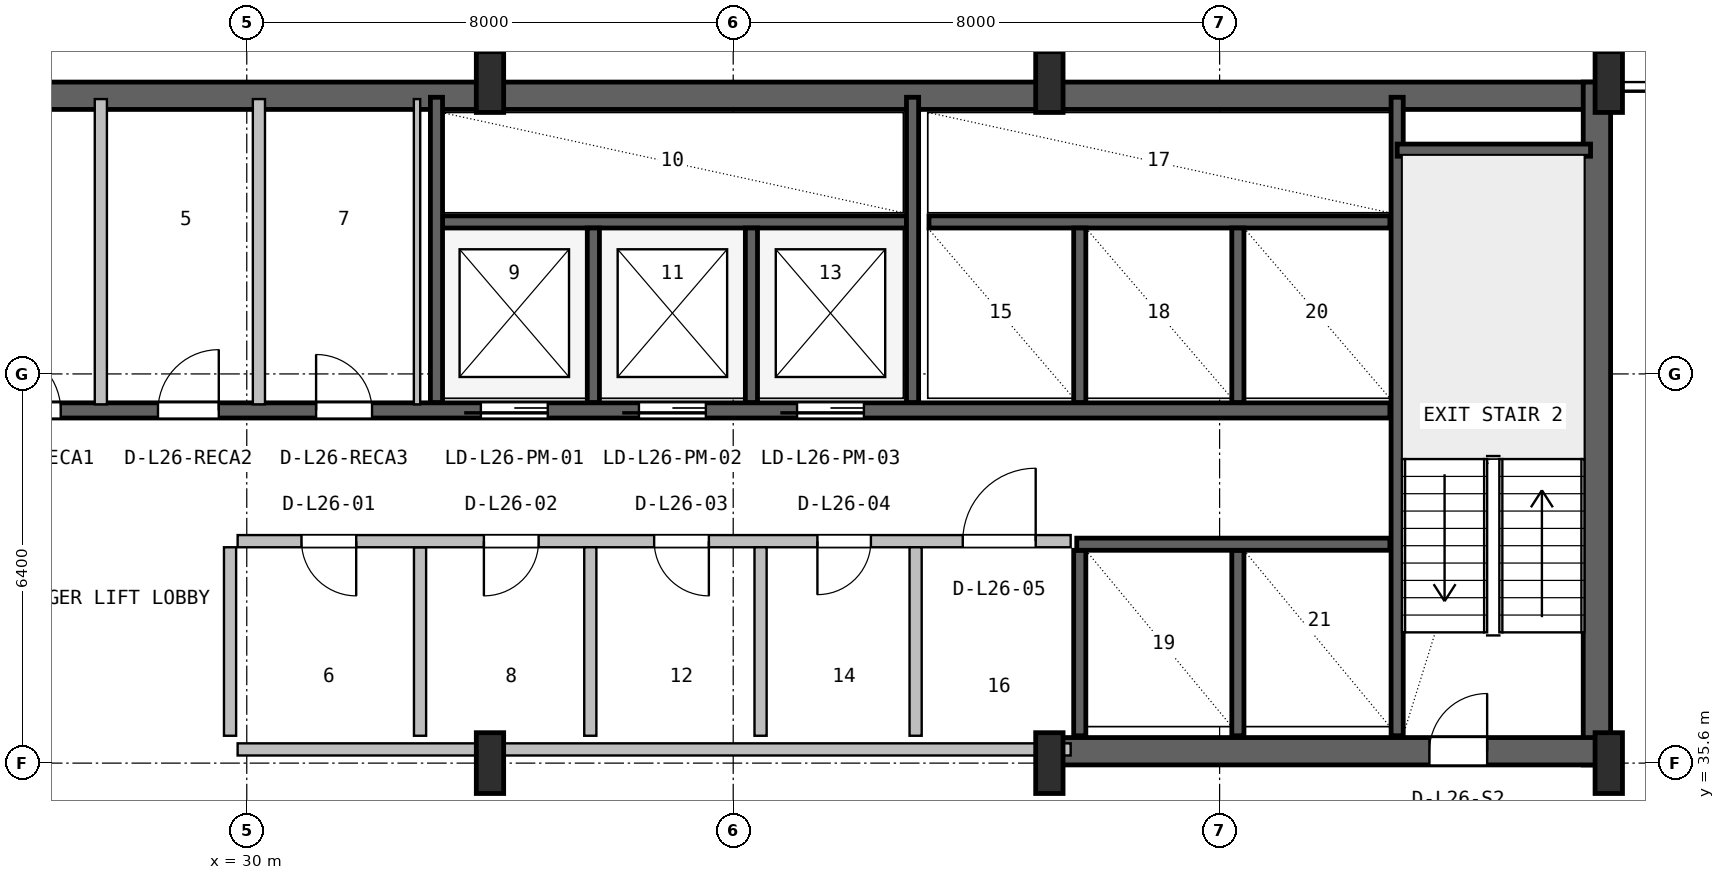
"""IFC4 building model, lengths in metres.
Left out: names, types, materials, properties, quantities, classifications, styles, units other than length and angle.
Written with IfcOpenShell. Run it as: python <this file> out.ifc"""

import sys

from ifc_helpers import new_model, si_unit, direction, frame, frame_2d, origin, origin_2d, place, context, subcontext, project, spatial, rectangle, i_section, extrude, source, transform, mapped, element, fill, save


model = new_model("IFC4")
c1 = context("Model", 3, precision=1e-05, world=origin(), true_north=direction((0.0, 1.0)))
c2 = subcontext(c1, "Body", "Model", "MODEL_VIEW")
j1 = project(units=[si_unit("LENGTHUNIT", "METRE"), si_unit("PLANEANGLEUNIT", "RADIAN")], contexts=[c1])
p1 = place(None, origin())
s1 = spatial("IfcSite", under=j1, at=p1, CompositionType="ELEMENT")
p2 = place(p1, origin())
s2 = spatial("IfcBuilding", under=s1, at=p2, CompositionType="ELEMENT")
p3 = place(p2, frame((0.0, 0.0, 110.6)))
s3 = spatial("IfcBuildingStorey", under=s2, at=p3, CompositionType="ELEMENT", Elevation=110.6)
p4 = place(p3, frame((15.6, 46.575, 0.0), z_axis=(0.0, 0.0, 1.0), x_axis=(1.0, 0.0, 0.0)))
e1 = element("IfcWall", 1, at=p4, inside=s3, PredefinedType="SHEAR", context=c2, shape_type="SweptSolid", body=[
    extrude(rectangle(XDim=36.8, YDim=0.45, at=frame_2d((18.4, 0.0))), origin(), (0.0, 0.0, 1.0), 3.55),
])
p5 = place(p3, frame((52.205, 35.57, 0.0), z_axis=(0.0, 0.0, 1.0), x_axis=(0.0, 1.0, 0.0)))
e2 = element("IfcWall", 2, at=p5, inside=s3, PredefinedType="SHEAR", context=c2, shape_type="SweptSolid", body=[
    extrude(rectangle(XDim=11.23, YDim=0.45, at=frame_2d((5.615, 0.0))), origin(), (0.0, 0.0, 1.0), 3.55),
])
p6 = place(p3, frame((43.2, 35.795, 0.0), z_axis=(0.0, 0.0, 1.0), x_axis=(1.0, 0.0, 0.0)))
e3 = element("IfcWall", 3, at=p6, inside=s3, PredefinedType="SHEAR", context=c2, shape_type="SweptSolid", body=[
    extrude(rectangle(XDim=9.23, YDim=0.45, at=frame_2d((4.615, 0.0))), origin(), (0.0, 0.0, 1.0), 3.55),
])
p7 = place(p6, frame((6.25, 0.0, 0.0)))
e4 = element("IfcOpeningElement", 4, at=p7, cuts=e3, PredefinedType="OPENING", context=c2, shape_type="SweptSolid", body=[
    extrude(rectangle(XDim=0.95, YDim=2.1, at=frame_2d((0.475, 1.05))), frame((0.0, 0.235, 0.0), z_axis=(0.0, -1.0, 0.0), x_axis=(1.0, 0.0, 0.0)), (0.0, 0.0, 1.0), 0.47),
])
m1 = source(origin(), c2, "Body", "SweptSolid", [
    extrude(i_section(OverallWidth=0.45, OverallDepth=1.0, WebThickness=0.016, FlangeThickness=0.03, FilletRadius=0.016, at=origin_2d()), origin(), (0.0, 0.0, 1.0), 3.8),
])
for number, where, z_axis, x_axis in (
    (5, (34.0, 35.6, 0.0), (0.0, 0.0, 1.0), (1.0, 0.0, 0.0)),
    (6, (34.0, 46.8, 0.0), (0.0, 0.0, 1.0), (1.0, 0.0, 0.0)),
    (7, (43.2, 35.6, 0.0), (0.0, 0.0, 1.0), (1.0, 0.0, 0.0)),
    (8, (43.2, 46.8, 0.0), (0.0, 0.0, 1.0), (1.0, 0.0, 0.0)),
    (9, (52.4, 35.6, 0.0), (0.0, 0.0, 1.0), (1.0, 0.0, 0.0)),
    (10, (52.4, 46.8, 0.0), (0.0, 0.0, 1.0), (1.0, 0.0, 0.0)),
):
    element("IfcColumn", number, at=place(p3, frame(where, z_axis=z_axis, x_axis=x_axis)), inside=s3, PredefinedType="COLUMN", context=c2, shape_type="MappedRepresentation", body=[
        mapped(m1, transform((0.0, 0.0, 0.0), x_axis=(1.0, 0.0, 0.0), y_axis=(0.0, 1.0, 0.0), z_axis=(0.0, 0.0, 1.0), scale=1.0)),
    ])
p8 = place(p3, frame((48.92, 36.05, 0.0), z_axis=(0.0, 0.0, 1.0), x_axis=(0.0, 1.0, 0.0)))
e11 = element("IfcWall", 11, at=p8, inside=s3, PredefinedType="SHEAR", context=c2, shape_type="SweptSolid", body=[
    extrude(rectangle(XDim=10.5, YDim=0.2, at=frame_2d((5.25, 0.0))), origin(), (0.0, 0.0, 1.0), 3.55),
])
p9 = place(p3, frame((48.92, 45.68, 0.0), z_axis=(0.0, 0.0, 1.0), x_axis=(1.0, 0.0, 0.0)))
e12 = element("IfcWall", 12, at=p9, inside=s3, PredefinedType="SHEAR", context=c2, shape_type="SweptSolid", body=[
    extrude(rectangle(XDim=3.18, YDim=0.2, at=frame_2d((1.59, 0.0))), origin(), (0.0, 0.0, 1.0), 3.55),
])
p10 = place(p3, frame((24.98, 41.4, 0.0), z_axis=(0.0, 0.0, 1.0), x_axis=(1.0, 0.0, 0.0)))
e13 = element("IfcWall", 13, at=p10, inside=s3, PredefinedType="SHEAR", context=c2, shape_type="SweptSolid", body=[
    extrude(rectangle(XDim=23.82, YDim=0.25, at=frame_2d((11.91, 0.0))), origin(), (0.0, 0.0, 1.0), 3.55),
])
p11 = place(p10, frame((8.87, 0.0, 0.0)))
e14 = element("IfcOpeningElement", 14, at=p11, cuts=e13, PredefinedType="OPENING", context=c2, shape_type="SweptSolid", body=[
    extrude(rectangle(XDim=1.1, YDim=2.18, at=frame_2d((0.55, 1.09))), frame((0.0, 0.135, 0.0), z_axis=(0.0, -1.0, 0.0), x_axis=(1.0, 0.0, 0.0)), (0.0, 0.0, 1.0), 0.27),
])
p12 = place(p10, frame((11.47, 0.0, 0.0)))
e15 = element("IfcOpeningElement", 15, at=p12, cuts=e13, PredefinedType="OPENING", context=c2, shape_type="SweptSolid", body=[
    extrude(rectangle(XDim=1.1, YDim=2.18, at=frame_2d((0.55, 1.09))), frame((0.0, 0.135, 0.0), z_axis=(0.0, -1.0, 0.0), x_axis=(1.0, 0.0, 0.0)), (0.0, 0.0, 1.0), 0.27),
])
p13 = place(p10, frame((14.07, 0.0, 0.0)))
e16 = element("IfcOpeningElement", 16, at=p13, cuts=e13, PredefinedType="OPENING", context=c2, shape_type="SweptSolid", body=[
    extrude(rectangle(XDim=1.1, YDim=2.18, at=frame_2d((0.55, 1.09))), frame((0.0, 0.135, 0.0), z_axis=(0.0, -1.0, 0.0), x_axis=(1.0, 0.0, 0.0)), (0.0, 0.0, 1.0), 0.27),
])
p14 = place(p10, frame((0.96, 0.0, 0.0)))
e17 = element("IfcOpeningElement", 17, at=p14, cuts=e13, PredefinedType="OPENING", context=c2, shape_type="SweptSolid", body=[
    extrude(rectangle(XDim=1.0, YDim=2.08, at=frame_2d((0.5, 1.04))), frame((0.0, 0.135, 0.0), z_axis=(0.0, -1.0, 0.0), x_axis=(1.0, 0.0, 0.0)), (0.0, 0.0, 1.0), 0.27),
])
p15 = place(p10, frame((3.56, 0.0, 0.0)))
e18 = element("IfcOpeningElement", 18, at=p15, cuts=e13, PredefinedType="OPENING", context=c2, shape_type="SweptSolid", body=[
    extrude(rectangle(XDim=1.0, YDim=2.08, at=frame_2d((0.5, 1.04))), frame((0.0, 0.135, 0.0), z_axis=(0.0, -1.0, 0.0), x_axis=(1.0, 0.0, 0.0)), (0.0, 0.0, 1.0), 0.27),
])
p16 = place(p10, frame((6.16, 0.0, 0.0)))
e19 = element("IfcOpeningElement", 19, at=p16, cuts=e13, PredefinedType="OPENING", context=c2, shape_type="SweptSolid", body=[
    extrude(rectangle(XDim=0.92, YDim=2.08, at=frame_2d((0.46, 1.04))), frame((0.0, 0.135, 0.0), z_axis=(0.0, -1.0, 0.0), x_axis=(1.0, 0.0, 0.0)), (0.0, 0.0, 1.0), 0.27),
])
p17 = place(p3, frame((33.22, 44.5, 0.0), z_axis=(0.0, 0.0, 1.0), x_axis=(1.0, 0.0, 0.0)))
e20 = element("IfcWall", 20, at=p17, inside=s3, PredefinedType="SHEAR", context=c2, shape_type="SweptSolid", body=[
    extrude(rectangle(XDim=7.63, YDim=0.2, at=frame_2d((3.815, 0.0))), origin(), (0.0, 0.0, 1.0), 3.55),
])
p18 = place(p3, frame((33.12, 41.53, 0.0), z_axis=(0.0, 0.0, 1.0), x_axis=(0.0, 1.0, 0.0)))
e21 = element("IfcWall", 21, at=p18, inside=s3, PredefinedType="SHEAR", context=c2, shape_type="SweptSolid", body=[
    extrude(rectangle(XDim=5.02, YDim=0.2, at=frame_2d((2.51, 0.0))), origin(), (0.0, 0.0, 1.0), 3.55),
])
for number, where, z_axis, x_axis in (
    (22, (35.7, 41.53, 0.0), (0.0, 0.0, 1.0), (0.0, 1.0, 0.0)),
    (23, (38.3, 41.53, 0.0), (0.0, 0.0, 1.0), (0.0, 1.0, 0.0)),
):
    element("IfcWall", number, at=place(p3, frame(where, z_axis=z_axis, x_axis=x_axis)), inside=s3, PredefinedType="SHEAR", context=c2, shape_type="SweptSolid", body=[
        extrude(rectangle(XDim=2.87, YDim=0.2, at=frame_2d((1.435, 0.0))), origin(), (0.0, 0.0, 1.0), 3.55),
    ])
p19 = place(p3, frame((40.95, 41.53, 0.0), z_axis=(0.0, 0.0, 1.0), x_axis=(0.0, 1.0, 0.0)))
e24 = element("IfcWall", 24, at=p19, inside=s3, PredefinedType="SHEAR", context=c2, shape_type="SweptSolid", body=[
    extrude(rectangle(XDim=5.02, YDim=0.2, at=frame_2d((2.51, 0.0))), origin(), (0.0, 0.0, 1.0), 3.55),
])
p20 = place(p3, frame((41.22, 44.5, 0.0), z_axis=(0.0, 0.0, 1.0), x_axis=(1.0, 0.0, 0.0)))
e25 = element("IfcWall", 25, at=p20, inside=s3, PredefinedType="SHEAR", context=c2, shape_type="SweptSolid", body=[
    extrude(rectangle(XDim=7.58, YDim=0.2, at=frame_2d((3.79, 0.0))), origin(), (0.0, 0.0, 1.0), 3.55),
])
for number, where, z_axis, x_axis in (
    (26, (43.7, 41.53, 0.0), (0.0, 0.0, 1.0), (0.0, 1.0, 0.0)),
    (27, (46.3, 41.53, 0.0), (0.0, 0.0, 1.0), (0.0, 1.0, 0.0)),
):
    element("IfcWall", number, at=place(p3, frame(where, z_axis=z_axis, x_axis=x_axis)), inside=s3, PredefinedType="SHEAR", context=c2, shape_type="SweptSolid", body=[
        extrude(rectangle(XDim=2.87, YDim=0.2, at=frame_2d((1.435, 0.0))), origin(), (0.0, 0.0, 1.0), 3.55),
    ])
for number, where, z_axis, x_axis in (
    (28, (43.7, 36.05, 0.0), (0.0, 0.0, 1.0), (0.0, 1.0, 0.0)),
    (29, (46.3, 36.05, 0.0), (0.0, 0.0, 1.0), (0.0, 1.0, 0.0)),
):
    element("IfcWall", number, at=place(p3, frame(where, z_axis=z_axis, x_axis=x_axis)), inside=s3, PredefinedType="SHEAR", context=c2, shape_type="SweptSolid", body=[
        extrude(rectangle(XDim=3.05, YDim=0.2, at=frame_2d((1.525, 0.0))), origin(), (0.0, 0.0, 1.0), 3.55),
    ])
p21 = place(p3, frame((43.65, 39.2, 0.0), z_axis=(0.0, 0.0, 1.0), x_axis=(1.0, 0.0, 0.0)))
e30 = element("IfcWall", 30, at=p21, inside=s3, PredefinedType="SHEAR", context=c2, shape_type="SweptSolid", body=[
    extrude(rectangle(XDim=5.15, YDim=0.2, at=frame_2d((2.575, 0.0))), origin(), (0.0, 0.0, 1.0), 3.55),
])
p22 = place(p3, frame((29.85, 35.825, 0.0), z_axis=(0.0, 0.0, 1.0), x_axis=(1.0, 0.0, 0.0)))
e31 = element("IfcWall", 31, at=p22, inside=s3, PredefinedType="SOLIDWALL", context=c2, shape_type="SweptSolid", body=[
    extrude(rectangle(XDim=13.7, YDim=0.2, at=frame_2d((6.85, 0.0))), origin(), (0.0, 0.0, 1.0), 2.325),
])
p23 = place(p3, frame((32.85, 36.05, 0.0), z_axis=(0.0, 0.0, 1.0), x_axis=(0.0, 1.0, 0.0)))
e32 = element("IfcWall", 32, at=p23, inside=s3, PredefinedType="PLUMBINGWALL", context=c2, shape_type="SweptSolid", body=[
    extrude(rectangle(XDim=3.1, YDim=0.2, at=frame_2d((1.55, 0.0))), origin(), (0.0, 0.0, 1.0), 3.53),
])
p24 = place(p3, frame((29.85, 39.25, 0.0), z_axis=(0.0, 0.0, 1.0), x_axis=(1.0, 0.0, 0.0)))
e33 = element("IfcWall", 33, at=p24, inside=s3, PredefinedType="SOLIDWALL", context=c2, shape_type="SweptSolid", body=[
    extrude(rectangle(XDim=13.7, YDim=0.2, at=frame_2d((6.85, 0.0))), origin(), (0.0, 0.0, 1.0), 3.53),
])
p25 = place(p24, frame((1.05, 0.0, 0.0)))
e34 = element("IfcOpeningElement", 34, at=p25, cuts=e33, PredefinedType="OPENING", context=c2, shape_type="SweptSolid", body=[
    extrude(rectangle(XDim=0.9, YDim=2.06, at=frame_2d((0.45, 1.03))), frame((0.0, 0.11, 0.0), z_axis=(0.0, -1.0, 0.0), x_axis=(1.0, 0.0, 0.0)), (0.0, 0.0, 1.0), 0.22),
])
p26 = place(p24, frame((4.05, 0.0, 0.0)))
e35 = element("IfcOpeningElement", 35, at=p26, cuts=e33, PredefinedType="OPENING", context=c2, shape_type="SweptSolid", body=[
    extrude(rectangle(XDim=0.9, YDim=2.06, at=frame_2d((0.45, 1.03))), frame((0.0, 0.11, 0.0), z_axis=(0.0, -1.0, 0.0), x_axis=(1.0, 0.0, 0.0)), (0.0, 0.0, 1.0), 0.22),
])
p27 = place(p24, frame((6.85, 0.0, 0.0)))
e36 = element("IfcOpeningElement", 36, at=p27, cuts=e33, PredefinedType="OPENING", context=c2, shape_type="SweptSolid", body=[
    extrude(rectangle(XDim=0.9, YDim=2.06, at=frame_2d((0.45, 1.03))), frame((0.0, 0.11, 0.0), z_axis=(0.0, -1.0, 0.0), x_axis=(1.0, 0.0, 0.0)), (0.0, 0.0, 1.0), 0.22),
])
p28 = place(p24, frame((9.535, 0.0, 0.0)))
e37 = element("IfcOpeningElement", 37, at=p28, cuts=e33, PredefinedType="OPENING", context=c2, shape_type="SweptSolid", body=[
    extrude(rectangle(XDim=0.88, YDim=2.06, at=frame_2d((0.44, 1.03))), frame((0.0, 0.11, 0.0), z_axis=(0.0, -1.0, 0.0), x_axis=(1.0, 0.0, 0.0)), (0.0, 0.0, 1.0), 0.22),
])
p29 = place(p24, frame((11.925, 0.0, 0.0)))
e38 = element("IfcOpeningElement", 38, at=p29, cuts=e33, PredefinedType="OPENING", context=c2, shape_type="SweptSolid", body=[
    extrude(rectangle(XDim=1.2, YDim=2.1, at=frame_2d((0.6, 1.05))), frame((0.0, 0.11, 0.0), z_axis=(0.0, -1.0, 0.0), x_axis=(1.0, 0.0, 0.0)), (0.0, 0.0, 1.0), 0.22),
])
for number, where, z_axis, x_axis in (
    (39, (29.725, 36.05, 0.0), (0.0, 0.0, 1.0), (0.0, 1.0, 0.0)),
    (40, (35.65, 36.05, 0.0), (0.0, 0.0, 1.0), (0.0, 1.0, 0.0)),
    (41, (38.45, 36.05, 0.0), (0.0, 0.0, 1.0), (0.0, 1.0, 0.0)),
):
    element("IfcWall", number, at=place(p3, frame(where, z_axis=z_axis, x_axis=x_axis)), inside=s3, PredefinedType="PLUMBINGWALL", context=c2, shape_type="SweptSolid", body=[
        extrude(rectangle(XDim=3.1, YDim=0.2, at=frame_2d((1.55, 0.0))), origin(), (0.0, 0.0, 1.0), 3.53),
    ])
p30 = place(p3, frame((41.0, 36.05, 0.0), z_axis=(0.0, 0.0, 1.0), x_axis=(0.0, 1.0, 0.0)))
e42 = element("IfcWall", 42, at=p30, inside=s3, PredefinedType="SOLIDWALL", context=c2, shape_type="SweptSolid", body=[
    extrude(rectangle(XDim=3.1, YDim=0.2, at=frame_2d((1.55, 0.0))), origin(), (0.0, 0.0, 1.0), 3.53),
])
for number, where, z_axis, x_axis in (
    (43, (27.6, 41.5, 0.0), (0.0, 0.0, 1.0), (0.0, 1.0, 0.0)),
    (44, (30.2, 41.5, 0.0), (0.0, 0.0, 1.0), (0.0, 1.0, 0.0)),
):
    element("IfcWall", number, at=place(p3, frame(where, z_axis=z_axis, x_axis=x_axis)), inside=s3, PredefinedType="SOLIDWALL", context=c2, shape_type="SweptSolid", body=[
        extrude(rectangle(XDim=5.02, YDim=0.2, at=frame_2d((2.51, 0.0))), origin(), (0.0, 0.0, 1.0), 3.53),
    ])
p31 = place(p3, frame((32.8, 41.5, 0.0), z_axis=(0.0, 0.0, 1.0), x_axis=(0.0, 1.0, 0.0)))
e45 = element("IfcWall", 45, at=p31, inside=s3, PredefinedType="PARTITIONING", context=c2, shape_type="SweptSolid", body=[
    extrude(rectangle(XDim=5.02, YDim=0.105, at=frame_2d((2.51, 0.0))), origin(), (0.0, 0.0, 1.0), 3.53),
])
m2 = source(origin(), c2, "Body", "SweptSolid", [
    extrude(rectangle(XDim=0.95, YDim=2.1, at=frame_2d((0.475, 1.05))), frame((0.0, 0.025, 0.0), z_axis=(0.0, -1.0, 0.0), x_axis=(1.0, 0.0, 0.0)), (0.0, 0.0, 1.0), 0.05),
])
p32 = place(p7, origin())
e46 = element("IfcDoor", 46, at=p32, inside=s3, OperationType="SINGLE_SWING_RIGHT", PredefinedType="DOOR", context=c2, shape_type="MappedRepresentation", body=[
    mapped(m2, transform((0.0, 0.0, 0.0), x_axis=(1.0, 0.0, 0.0), y_axis=(0.0, 1.0, 0.0), z_axis=(0.0, 0.0, 1.0), scale=1.0)),
])
fill(e4, e46)
m3 = source(origin(), c2, "Body", "SweptSolid", [
    extrude(rectangle(XDim=1.1, YDim=2.18, at=frame_2d((0.55, 1.09))), frame((0.0, 0.025, 0.0), z_axis=(0.0, -1.0, 0.0), x_axis=(1.0, 0.0, 0.0)), (0.0, 0.0, 1.0), 0.05),
])
p33 = place(p11, frame((1.1, 0.0, 0.0), z_axis=(0.0, 0.0, 1.0), x_axis=(-1.0, 0.0, 0.0)))
e47 = element("IfcDoor", 47, at=p33, inside=s3, OperationType="SLIDING_TO_LEFT", PredefinedType="DOOR", context=c2, shape_type="MappedRepresentation", body=[
    mapped(m3, transform((0.0, 0.0, 0.0), x_axis=(1.0, 0.0, 0.0), y_axis=(0.0, 1.0, 0.0), z_axis=(0.0, 0.0, 1.0), scale=1.0)),
])
fill(e14, e47)
p34 = place(p12, frame((1.1, 0.0, 0.0), z_axis=(0.0, 0.0, 1.0), x_axis=(-1.0, 0.0, 0.0)))
e48 = element("IfcDoor", 48, at=p34, inside=s3, OperationType="SLIDING_TO_LEFT", PredefinedType="DOOR", context=c2, shape_type="MappedRepresentation", body=[
    mapped(m3, transform((0.0, 0.0, 0.0), x_axis=(1.0, 0.0, 0.0), y_axis=(0.0, 1.0, 0.0), z_axis=(0.0, 0.0, 1.0), scale=1.0)),
])
fill(e15, e48)
p35 = place(p13, frame((1.1, 0.0, 0.0), z_axis=(0.0, 0.0, 1.0), x_axis=(-1.0, 0.0, 0.0)))
e49 = element("IfcDoor", 49, at=p35, inside=s3, OperationType="SLIDING_TO_LEFT", PredefinedType="DOOR", context=c2, shape_type="MappedRepresentation", body=[
    mapped(m3, transform((0.0, 0.0, 0.0), x_axis=(1.0, 0.0, 0.0), y_axis=(0.0, 1.0, 0.0), z_axis=(0.0, 0.0, 1.0), scale=1.0)),
])
fill(e16, e49)
m4 = source(origin(), c2, "Body", "SweptSolid", [
    extrude(rectangle(XDim=1.0, YDim=2.08, at=frame_2d((0.5, 1.04))), frame((0.0, 0.025, 0.0), z_axis=(0.0, -1.0, 0.0), x_axis=(1.0, 0.0, 0.0)), (0.0, 0.0, 1.0), 0.05),
])
p36 = place(p14, origin())
e50 = element("IfcDoor", 50, at=p36, inside=s3, OperationType="SINGLE_SWING_LEFT", PredefinedType="DOOR", context=c2, shape_type="MappedRepresentation", body=[
    mapped(m4, transform((0.0, 0.0, 0.0), x_axis=(1.0, 0.0, 0.0), y_axis=(0.0, 1.0, 0.0), z_axis=(0.0, 0.0, 1.0), scale=1.0)),
])
fill(e17, e50)
p37 = place(p15, origin())
e51 = element("IfcDoor", 51, at=p37, inside=s3, OperationType="SINGLE_SWING_RIGHT", PredefinedType="DOOR", context=c2, shape_type="MappedRepresentation", body=[
    mapped(m4, transform((0.0, 0.0, 0.0), x_axis=(1.0, 0.0, 0.0), y_axis=(0.0, 1.0, 0.0), z_axis=(0.0, 0.0, 1.0), scale=1.0)),
])
fill(e18, e51)
m5 = source(origin(), c2, "Body", "SweptSolid", [
    extrude(rectangle(XDim=0.92, YDim=2.08, at=frame_2d((0.46, 1.04))), frame((0.0, 0.025, 0.0), z_axis=(0.0, -1.0, 0.0), x_axis=(1.0, 0.0, 0.0)), (0.0, 0.0, 1.0), 0.05),
])
p38 = place(p16, origin())
e52 = element("IfcDoor", 52, at=p38, inside=s3, OperationType="SINGLE_SWING_LEFT", PredefinedType="DOOR", context=c2, shape_type="MappedRepresentation", body=[
    mapped(m5, transform((0.0, 0.0, 0.0), x_axis=(1.0, 0.0, 0.0), y_axis=(0.0, 1.0, 0.0), z_axis=(0.0, 0.0, 1.0), scale=1.0)),
])
fill(e19, e52)
m6 = source(origin(), c2, "Body", "SweptSolid", [
    extrude(rectangle(XDim=0.9, YDim=2.06, at=frame_2d((0.45, 1.03))), frame((0.0, 0.025, 0.0), z_axis=(0.0, -1.0, 0.0), x_axis=(1.0, 0.0, 0.0)), (0.0, 0.0, 1.0), 0.05),
])
p39 = place(p25, frame((0.9, 0.0, 0.0), z_axis=(0.0, 0.0, 1.0), x_axis=(-1.0, 0.0, 0.0)))
e53 = element("IfcDoor", 53, at=p39, inside=s3, OperationType="SINGLE_SWING_RIGHT", PredefinedType="DOOR", context=c2, shape_type="MappedRepresentation", body=[
    mapped(m6, transform((0.0, 0.0, 0.0), x_axis=(1.0, 0.0, 0.0), y_axis=(0.0, 1.0, 0.0), z_axis=(0.0, 0.0, 1.0), scale=1.0)),
])
fill(e34, e53)
p40 = place(p26, frame((0.9, 0.0, 0.0), z_axis=(0.0, 0.0, 1.0), x_axis=(-1.0, 0.0, 0.0)))
e54 = element("IfcDoor", 54, at=p40, inside=s3, OperationType="SINGLE_SWING_LEFT", PredefinedType="DOOR", context=c2, shape_type="MappedRepresentation", body=[
    mapped(m6, transform((0.0, 0.0, 0.0), x_axis=(1.0, 0.0, 0.0), y_axis=(0.0, 1.0, 0.0), z_axis=(0.0, 0.0, 1.0), scale=1.0)),
])
fill(e35, e54)
p41 = place(p27, frame((0.9, 0.0, 0.0), z_axis=(0.0, 0.0, 1.0), x_axis=(-1.0, 0.0, 0.0)))
e55 = element("IfcDoor", 55, at=p41, inside=s3, OperationType="SINGLE_SWING_RIGHT", PredefinedType="DOOR", context=c2, shape_type="MappedRepresentation", body=[
    mapped(m6, transform((0.0, 0.0, 0.0), x_axis=(1.0, 0.0, 0.0), y_axis=(0.0, 1.0, 0.0), z_axis=(0.0, 0.0, 1.0), scale=1.0)),
])
fill(e36, e55)
m7 = source(origin(), c2, "Body", "SweptSolid", [
    extrude(rectangle(XDim=0.88, YDim=2.06, at=frame_2d((0.44, 1.03))), frame((0.0, 0.025, 0.0), z_axis=(0.0, -1.0, 0.0), x_axis=(1.0, 0.0, 0.0)), (0.0, 0.0, 1.0), 0.05),
])
p42 = place(p28, frame((0.88, 0.0, 0.0), z_axis=(0.0, 0.0, 1.0), x_axis=(-1.0, 0.0, 0.0)))
e56 = element("IfcDoor", 56, at=p42, inside=s3, OperationType="SINGLE_SWING_LEFT", PredefinedType="DOOR", context=c2, shape_type="MappedRepresentation", body=[
    mapped(m7, transform((0.0, 0.0, 0.0), x_axis=(1.0, 0.0, 0.0), y_axis=(0.0, 1.0, 0.0), z_axis=(0.0, 0.0, 1.0), scale=1.0)),
])
fill(e37, e56)
m8 = source(origin(), c2, "Body", "SweptSolid", [
    extrude(rectangle(XDim=1.2, YDim=2.1, at=frame_2d((0.6, 1.05))), frame((0.0, 0.025, 0.0), z_axis=(0.0, -1.0, 0.0), x_axis=(1.0, 0.0, 0.0)), (0.0, 0.0, 1.0), 0.05),
])
p43 = place(p29, origin())
e57 = element("IfcDoor", 57, at=p43, inside=s3, OperationType="SINGLE_SWING_RIGHT", PredefinedType="DOOR", context=c2, shape_type="MappedRepresentation", body=[
    mapped(m8, transform((0.0, 0.0, 0.0), x_axis=(1.0, 0.0, 0.0), y_axis=(0.0, 1.0, 0.0), z_axis=(0.0, 0.0, 1.0), scale=1.0)),
])
fill(e38, e57)
save(model, sys.argv[1])
